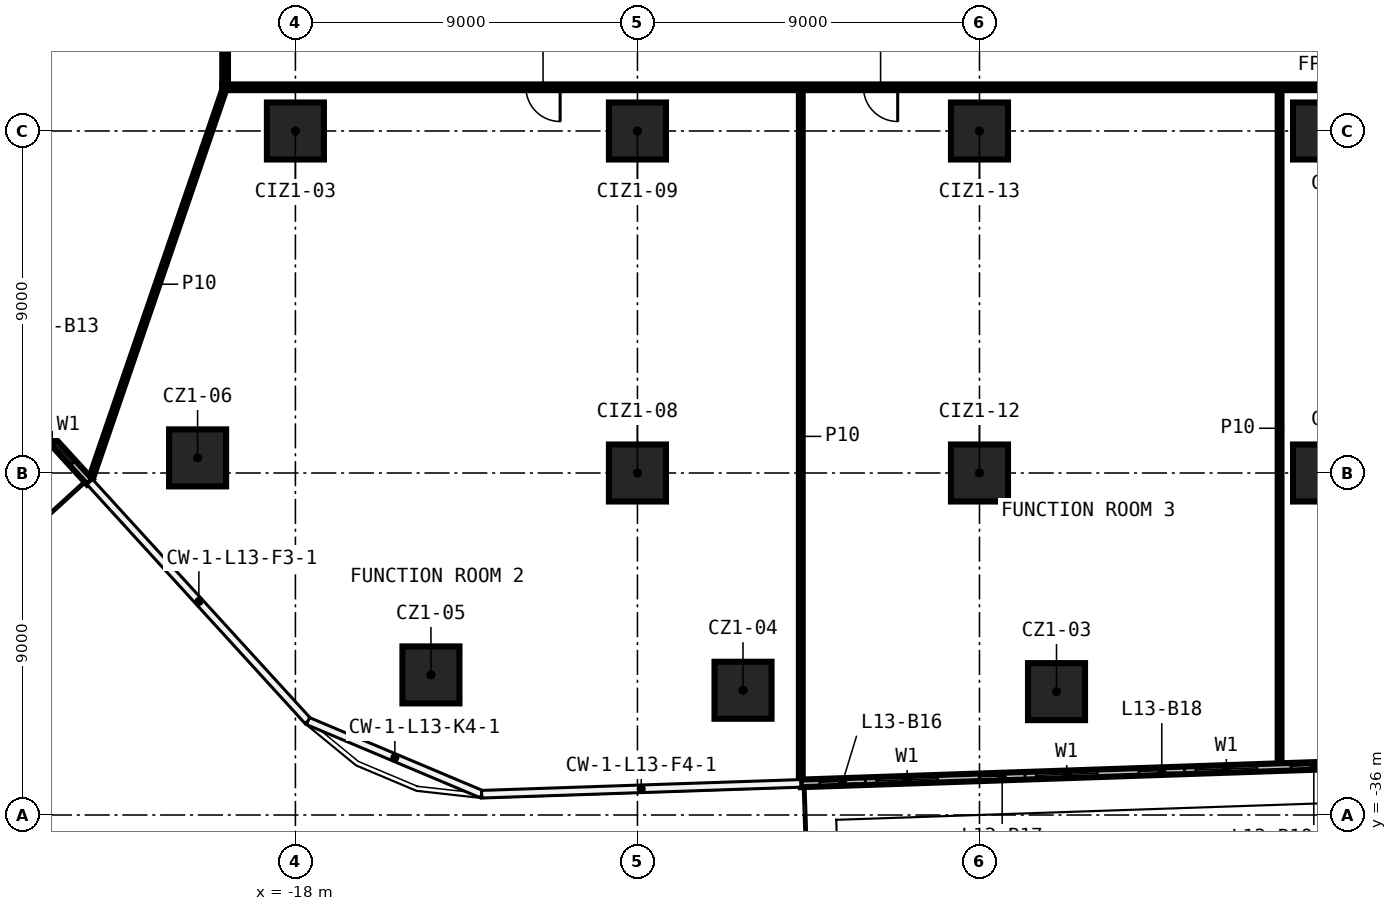
"""IFC4 building model, lengths in metres.
Left out: names, types, materials, properties, quantities, classifications, styles, units other than length and angle.
Written with IfcOpenShell. Run it as: python <this file> out.ifc"""

import sys

from ifc_helpers import new_model, si_unit, direction, frame, frame_2d, origin, origin_2d, place, context, subcontext, project, spatial, rectangle, extrude, element, fill, save


model = new_model("IFC4")
c1 = context("Model", 3, precision=1e-05, world=origin(), true_north=direction((0.0, 1.0)))
c2 = subcontext(c1, "Body", "Model", "MODEL_VIEW")
j1 = project(units=[si_unit("LENGTHUNIT", "METRE"), si_unit("PLANEANGLEUNIT", "RADIAN")], contexts=[c1])
p1 = place(None, origin())
s1 = spatial("IfcSite", under=j1, at=p1, CompositionType="ELEMENT")
p2 = place(p1, origin())
s2 = spatial("IfcBuilding", under=s1, at=p2, CompositionType="ELEMENT")
p3 = place(p2, frame((0.0, 0.0, 69.9)))
s3 = spatial("IfcBuildingStorey", under=s2, at=p3, CompositionType="ELEMENT", Elevation=69.9)
for number, where, z_axis, x_axis in (
    (1, (2.027, -32.753, 0.0), (0.0, 0.0, 1.0), (1.0, 0.0, 0.0)),
    (2, (-6.222, -32.717, 0.0), (0.0, 0.0, 1.0), (1.0, 0.0, 0.0)),
    (3, (-14.434, -32.313, 0.0), (0.0, 0.0, 1.0), (1.0, 0.0, 0.0)),
    (4, (-20.574, -26.602, 0.0), (0.0, 0.0, 1.0), (1.0, 0.0, 0.0)),
    (5, (-18.0, -18.0, 0.0), (0.0, 0.0, 1.0), (1.0, 0.0, 0.0)),
    (6, (-9.0, -27.0, 0.0), (0.0, 0.0, 1.0), (1.0, 0.0, 0.0)),
    (7, (-9.0, -18.0, 0.0), (0.0, 0.0, 1.0), (1.0, 0.0, 0.0)),
    (8, (0.0, -27.0, 0.0), (0.0, 0.0, 1.0), (1.0, 0.0, 0.0)),
    (9, (0.0, -18.0, 0.0), (0.0, 0.0, 1.0), (1.0, 0.0, 0.0)),
    (10, (9.0, -27.0, 0.0), (0.0, 0.0, 1.0), (1.0, 0.0, 0.0)),
    (11, (9.0, -18.0, 0.0), (0.0, 0.0, 1.0), (1.0, 0.0, 0.0)),
):
    element("IfcColumn", number, at=place(p3, frame(where, z_axis=z_axis, x_axis=x_axis)), inside=s3, PredefinedType="COLUMN", context=c2, shape_type="SweptSolid", body=[
        extrude(rectangle(XDim=1.5, YDim=1.5, at=origin_2d()), origin(), (0.0, 0.0, 1.0), 3.3),
    ])
p4 = place(p3, frame((19.925, -16.85, 0.0), z_axis=(0.0, 0.0, 1.0), x_axis=(-1.0, 0.0, 0.0)))
e12 = element("IfcWall", 12, at=p4, inside=s3, PredefinedType="PARTITIONING", context=c2, shape_type="SweptSolid", body=[
    extrude(rectangle(XDim=39.85, YDim=0.15, at=frame_2d((19.925, 0.0))), origin(), (0.0, 0.0, 1.0), 3.3),
])
p5 = place(p4, frame((30.959, 0.0, 0.0)))
e13 = element("IfcOpeningElement", 13, at=p5, cuts=e12, PredefinedType="OPENING", context=c2, shape_type="SweptSolid", body=[
    extrude(rectangle(XDim=0.9, YDim=2.1, at=frame_2d((0.45, 1.05))), frame((0.0, 0.085, 0.0), z_axis=(0.0, -1.0, 0.0), x_axis=(1.0, 0.0, 0.0)), (0.0, 0.0, 1.0), 0.17),
])
p6 = place(p4, frame((22.077, 0.0, 0.0)))
e14 = element("IfcOpeningElement", 14, at=p6, cuts=e12, PredefinedType="OPENING", context=c2, shape_type="SweptSolid", body=[
    extrude(rectangle(XDim=0.9, YDim=2.1, at=frame_2d((0.45, 1.05))), frame((0.0, 0.085, 0.0), z_axis=(0.0, -1.0, 0.0), x_axis=(1.0, 0.0, 0.0)), (0.0, 0.0, 1.0), 0.17),
])
p7 = place(p3, frame((-23.404, -27.213, 0.0), z_axis=(0.0, 0.0, 1.0), x_axis=(0.32441263541, 0.945915663253, 0.0)))
e15 = element("IfcWall", 15, at=p7, inside=s3, PredefinedType="PARTITIONING", context=c2, shape_type="SweptSolid", body=[
    extrude(rectangle(XDim=10.955, YDim=0.1, at=frame_2d((5.478, 0.0))), origin(), (0.0, 0.0, 1.0), 3.3),
])
p8 = place(p3, frame((7.897, -34.72, 0.0), z_axis=(0.0, 0.0, 1.0), x_axis=(0.0, 1.0, 0.0)))
e16 = element("IfcWall", 16, at=p8, inside=s3, PredefinedType="PARTITIONING", context=c2, shape_type="SweptSolid", body=[
    extrude(rectangle(XDim=17.795, YDim=0.1, at=frame_2d((8.897, 0.0))), origin(), (0.0, 0.0, 1.0), 3.3),
])
p9 = place(p3, frame((-4.702, -35.148, 0.0), z_axis=(0.0, 0.0, 1.0), x_axis=(0.0, 1.0, 0.0)))
e17 = element("IfcWall", 17, at=p9, inside=s3, PredefinedType="PARTITIONING", context=c2, shape_type="SweptSolid", body=[
    extrude(rectangle(XDim=18.223, YDim=0.1, at=frame_2d((9.111, 0.0))), origin(), (0.0, 0.0, 1.0), 3.3),
])
p10 = place(p3, frame((-19.85, -16.775, 0.0), z_axis=(0.0, 0.0, 1.0), x_axis=(0.0, 1.0, 0.0)))
e18 = element("IfcWall", 18, at=p10, inside=s3, PredefinedType="PARTITIONING", context=c2, shape_type="SweptSolid", body=[
    extrude(rectangle(XDim=33.55, YDim=0.15, at=frame_2d((16.775, 0.0))), origin(), (0.0, 0.0, 1.0), 3.3),
])
p11 = place(p10, frame((10.123, 0.0, 0.0)))
e19 = element("IfcOpeningElement", 19, at=p11, cuts=e18, PredefinedType="OPENING", context=c2, shape_type="SweptSolid", body=[
    extrude(rectangle(XDim=1.0, YDim=2.1, at=frame_2d((0.5, 1.05))), frame((0.0, 0.085, 0.0), z_axis=(0.0, -1.0, 0.0), x_axis=(1.0, 0.0, 0.0)), (0.0, 0.0, 1.0), 0.17),
])
p12 = place(p10, frame((4.179, 0.0, 0.0)))
e20 = element("IfcOpeningElement", 20, at=p12, cuts=e18, PredefinedType="OPENING", context=c2, shape_type="SweptSolid", body=[
    extrude(rectangle(XDim=0.9, YDim=2.1, at=frame_2d((0.45, 1.05))), frame((0.0, 0.085, 0.0), z_axis=(0.0, -1.0, 0.0), x_axis=(1.0, 0.0, 0.0)), (0.0, 0.0, 1.0), 0.17),
])
p13 = place(p10, frame((27.651, 0.0, 0.0)))
e21 = element("IfcOpeningElement", 21, at=p13, cuts=e18, PredefinedType="OPENING", context=c2, shape_type="SweptSolid", body=[
    extrude(rectangle(XDim=1.0, YDim=2.1, at=frame_2d((0.5, 1.05))), frame((0.0, 0.085, 0.0), z_axis=(0.0, -1.0, 0.0), x_axis=(1.0, 0.0, 0.0)), (0.0, 0.0, 1.0), 0.17),
])
p14 = place(p10, frame((20.601, 0.0, 0.0)))
e22 = element("IfcOpeningElement", 22, at=p14, cuts=e18, PredefinedType="OPENING", context=c2, shape_type="SweptSolid", body=[
    extrude(rectangle(XDim=1.0, YDim=2.1, at=frame_2d((0.5, 1.05))), frame((0.0, 0.085, 0.0), z_axis=(0.0, -1.0, 0.0), x_axis=(1.0, 0.0, 0.0)), (0.0, 0.0, 1.0), 0.17),
])
p15 = place(p3, frame((-34.906, -14.636, 0.0), z_axis=(0.0, 0.0, 1.0), x_axis=(0.674011334321, -0.738721003632, 0.0)))
e23 = element("IfcWall", 23, at=p15, inside=s3, PredefinedType="SOLIDWALL", context=c2, shape_type="SweptSolid", body=[
    extrude(rectangle(XDim=17.053, YDim=0.2, at=frame_2d((8.527, 0.0))), origin(), (0.0, 0.0, 1.0), 3.3),
])
p16 = place(p15, frame((0.5, 0.0, 0.6)))
e24 = element("IfcOpeningElement", 24, at=p16, cuts=e23, PredefinedType="OPENING", context=c2, shape_type="SweptSolid", body=[
    extrude(rectangle(XDim=1.6, YDim=2.4, at=frame_2d((0.8, 1.2))), frame((0.0, 0.11, 0.0), z_axis=(0.0, -1.0, 0.0), x_axis=(1.0, 0.0, 0.0)), (0.0, 0.0, 1.0), 0.22),
])
p17 = place(p15, frame((2.4, 0.0, 0.0)))
e25 = element("IfcOpeningElement", 25, at=p17, cuts=e23, PredefinedType="OPENING", context=c2, shape_type="SweptSolid", body=[
    extrude(rectangle(XDim=1.2, YDim=2.4, at=frame_2d((0.6, 1.2))), frame((0.0, 0.11, 0.0), z_axis=(0.0, -1.0, 0.0), x_axis=(1.0, 0.0, 0.0)), (0.0, 0.0, 1.0), 0.22),
])
p18 = place(p15, frame((6.263, 0.0, 0.6)))
e26 = element("IfcOpeningElement", 26, at=p18, cuts=e23, PredefinedType="OPENING", context=c2, shape_type="SweptSolid", body=[
    extrude(rectangle(XDim=1.6, YDim=2.4, at=frame_2d((0.8, 1.2))), frame((0.0, 0.11, 0.0), z_axis=(0.0, -1.0, 0.0), x_axis=(1.0, 0.0, 0.0)), (0.0, 0.0, 1.0), 0.22),
])
p19 = place(p15, frame((4.763, 0.0, 0.0)))
e27 = element("IfcOpeningElement", 27, at=p19, cuts=e23, PredefinedType="OPENING", context=c2, shape_type="SweptSolid", body=[
    extrude(rectangle(XDim=1.2, YDim=2.4, at=frame_2d((0.6, 1.2))), frame((0.0, 0.11, 0.0), z_axis=(0.0, -1.0, 0.0), x_axis=(1.0, 0.0, 0.0)), (0.0, 0.0, 1.0), 0.22),
])
p20 = place(p15, frame((9.027, 0.0, 0.6)))
e28 = element("IfcOpeningElement", 28, at=p20, cuts=e23, PredefinedType="OPENING", context=c2, shape_type="SweptSolid", body=[
    extrude(rectangle(XDim=1.6, YDim=2.4, at=frame_2d((0.8, 1.2))), frame((0.0, 0.11, 0.0), z_axis=(0.0, -1.0, 0.0), x_axis=(1.0, 0.0, 0.0)), (0.0, 0.0, 1.0), 0.22),
])
p21 = place(p15, frame((10.927, 0.0, 0.0)))
e29 = element("IfcOpeningElement", 29, at=p21, cuts=e23, PredefinedType="OPENING", context=c2, shape_type="SweptSolid", body=[
    extrude(rectangle(XDim=1.2, YDim=2.4, at=frame_2d((0.6, 1.2))), frame((0.0, 0.11, 0.0), z_axis=(0.0, -1.0, 0.0), x_axis=(1.0, 0.0, 0.0)), (0.0, 0.0, 1.0), 0.22),
])
p22 = place(p15, frame((14.79, 0.0, 0.6)))
e30 = element("IfcOpeningElement", 30, at=p22, cuts=e23, PredefinedType="OPENING", context=c2, shape_type="SweptSolid", body=[
    extrude(rectangle(XDim=1.6, YDim=2.4, at=frame_2d((0.8, 1.2))), frame((0.0, 0.11, 0.0), z_axis=(0.0, -1.0, 0.0), x_axis=(1.0, 0.0, 0.0)), (0.0, 0.0, 1.0), 0.22),
])
p23 = place(p15, frame((13.29, 0.0, 0.0)))
e31 = element("IfcOpeningElement", 31, at=p23, cuts=e23, PredefinedType="OPENING", context=c2, shape_type="SweptSolid", body=[
    extrude(rectangle(XDim=1.2, YDim=2.4, at=frame_2d((0.6, 1.2))), frame((0.0, 0.11, 0.0), z_axis=(0.0, -1.0, 0.0), x_axis=(1.0, 0.0, 0.0)), (0.0, 0.0, 1.0), 0.22),
])
p24 = place(p3, frame((-4.702, -35.168, 0.0), z_axis=(0.0, 0.0, 1.0), x_axis=(0.999424265527, 0.033928416948, 0.0)))
e32 = element("IfcWall", 32, at=p24, inside=s3, PredefinedType="SOLIDWALL", context=c2, shape_type="SweptSolid", body=[
    extrude(rectangle(XDim=21.012, YDim=0.2, at=frame_2d((10.506, 0.0))), origin(), (0.0, 0.0, 1.0), 3.3),
])
p25 = place(p24, frame((2.0, 0.0, 0.6)))
e33 = element("IfcOpeningElement", 33, at=p25, cuts=e32, PredefinedType="OPENING", context=c2, shape_type="SweptSolid", body=[
    extrude(rectangle(XDim=1.6, YDim=2.4, at=frame_2d((0.8, 1.2))), frame((0.0, 0.11, 0.0), z_axis=(0.0, -1.0, 0.0), x_axis=(1.0, 0.0, 0.0)), (0.0, 0.0, 1.0), 0.22),
])
p26 = place(p24, frame((0.5, 0.0, 0.0)))
e34 = element("IfcOpeningElement", 34, at=p26, cuts=e32, PredefinedType="OPENING", context=c2, shape_type="SweptSolid", body=[
    extrude(rectangle(XDim=1.2, YDim=2.4, at=frame_2d((0.6, 1.2))), frame((0.0, 0.11, 0.0), z_axis=(0.0, -1.0, 0.0), x_axis=(1.0, 0.0, 0.0)), (0.0, 0.0, 1.0), 0.22),
])
p27 = place(p24, frame((6.202, 0.0, 0.6)))
e35 = element("IfcOpeningElement", 35, at=p27, cuts=e32, PredefinedType="OPENING", context=c2, shape_type="SweptSolid", body=[
    extrude(rectangle(XDim=1.6, YDim=2.4, at=frame_2d((0.8, 1.2))), frame((0.0, 0.11, 0.0), z_axis=(0.0, -1.0, 0.0), x_axis=(1.0, 0.0, 0.0)), (0.0, 0.0, 1.0), 0.22),
])
p28 = place(p24, frame((4.702, 0.0, 0.0)))
e36 = element("IfcOpeningElement", 36, at=p28, cuts=e32, PredefinedType="OPENING", context=c2, shape_type="SweptSolid", body=[
    extrude(rectangle(XDim=1.2, YDim=2.4, at=frame_2d((0.6, 1.2))), frame((0.0, 0.11, 0.0), z_axis=(0.0, -1.0, 0.0), x_axis=(1.0, 0.0, 0.0)), (0.0, 0.0, 1.0), 0.22),
])
p29 = place(p24, frame((10.405, 0.0, 0.6)))
e37 = element("IfcOpeningElement", 37, at=p29, cuts=e32, PredefinedType="OPENING", context=c2, shape_type="SweptSolid", body=[
    extrude(rectangle(XDim=1.6, YDim=2.4, at=frame_2d((0.8, 1.2))), frame((0.0, 0.11, 0.0), z_axis=(0.0, -1.0, 0.0), x_axis=(1.0, 0.0, 0.0)), (0.0, 0.0, 1.0), 0.22),
])
p30 = place(p24, frame((8.905, 0.0, 0.0)))
e38 = element("IfcOpeningElement", 38, at=p30, cuts=e32, PredefinedType="OPENING", context=c2, shape_type="SweptSolid", body=[
    extrude(rectangle(XDim=1.2, YDim=2.4, at=frame_2d((0.6, 1.2))), frame((0.0, 0.11, 0.0), z_axis=(0.0, -1.0, 0.0), x_axis=(1.0, 0.0, 0.0)), (0.0, 0.0, 1.0), 0.22),
])
p31 = place(p24, frame((14.607, 0.0, 0.6)))
e39 = element("IfcOpeningElement", 39, at=p31, cuts=e32, PredefinedType="OPENING", context=c2, shape_type="SweptSolid", body=[
    extrude(rectangle(XDim=1.6, YDim=2.4, at=frame_2d((0.8, 1.2))), frame((0.0, 0.11, 0.0), z_axis=(0.0, -1.0, 0.0), x_axis=(1.0, 0.0, 0.0)), (0.0, 0.0, 1.0), 0.22),
])
p32 = place(p24, frame((12.907, 0.0, 0.0)))
e40 = element("IfcOpeningElement", 40, at=p32, cuts=e32, PredefinedType="OPENING", context=c2, shape_type="SweptSolid", body=[
    extrude(rectangle(XDim=1.2, YDim=2.4, at=frame_2d((0.6, 1.2))), frame((0.0, 0.11, 0.0), z_axis=(0.0, -1.0, 0.0), x_axis=(1.0, 0.0, 0.0)), (0.0, 0.0, 1.0), 0.22),
])
p33 = place(p24, frame((18.809, 0.0, 0.6)))
e41 = element("IfcOpeningElement", 41, at=p33, cuts=e32, PredefinedType="OPENING", context=c2, shape_type="SweptSolid", body=[
    extrude(rectangle(XDim=1.6, YDim=2.4, at=frame_2d((0.8, 1.2))), frame((0.0, 0.11, 0.0), z_axis=(0.0, -1.0, 0.0), x_axis=(1.0, 0.0, 0.0)), (0.0, 0.0, 1.0), 0.22),
])
p34 = place(p24, frame((17.309, 0.0, 0.0)))
e42 = element("IfcOpeningElement", 42, at=p34, cuts=e32, PredefinedType="OPENING", context=c2, shape_type="SweptSolid", body=[
    extrude(rectangle(XDim=1.2, YDim=2.4, at=frame_2d((0.6, 1.2))), frame((0.0, 0.11, 0.0), z_axis=(0.0, -1.0, 0.0), x_axis=(1.0, 0.0, 0.0)), (0.0, 0.0, 1.0), 0.22),
])
p35 = place(p5, origin())
e43 = element("IfcDoor", 43, at=p35, inside=s3, OperationType="SINGLE_SWING_RIGHT", PredefinedType="DOOR", context=c2, shape_type="SweptSolid", body=[
    extrude(rectangle(XDim=0.9, YDim=2.1, at=frame_2d((0.45, 1.05))), frame((0.0, 0.025, 0.0), z_axis=(0.0, -1.0, 0.0), x_axis=(1.0, 0.0, 0.0)), (0.0, 0.0, 1.0), 0.05),
])
fill(e13, e43)
p36 = place(p6, origin())
e44 = element("IfcDoor", 44, at=p36, inside=s3, OperationType="SINGLE_SWING_LEFT", PredefinedType="DOOR", context=c2, shape_type="SweptSolid", body=[
    extrude(rectangle(XDim=0.9, YDim=2.1, at=frame_2d((0.45, 1.05))), frame((0.0, 0.025, 0.0), z_axis=(0.0, -1.0, 0.0), x_axis=(1.0, 0.0, 0.0)), (0.0, 0.0, 1.0), 0.05),
])
fill(e14, e44)
p37 = place(p22, origin())
e45 = element("IfcWindow", 45, at=p37, inside=s3, PartitioningType="SINGLE_PANEL", PredefinedType="WINDOW", context=c2, shape_type="SweptSolid", body=[
    extrude(rectangle(XDim=1.6, YDim=2.4, at=frame_2d((0.8, 1.2))), frame((0.0, 0.03, 0.0), z_axis=(0.0, -1.0, 0.0), x_axis=(1.0, 0.0, 0.0)), (0.0, 0.0, 1.0), 0.06),
])
fill(e30, e45)
p38 = place(p25, origin())
e46 = element("IfcWindow", 46, at=p38, inside=s3, PartitioningType="SINGLE_PANEL", PredefinedType="WINDOW", context=c2, shape_type="SweptSolid", body=[
    extrude(rectangle(XDim=1.6, YDim=2.4, at=frame_2d((0.8, 1.2))), frame((0.0, 0.03, 0.0), z_axis=(0.0, -1.0, 0.0), x_axis=(1.0, 0.0, 0.0)), (0.0, 0.0, 1.0), 0.06),
])
fill(e33, e46)
p39 = place(p26, origin())
e47 = element("IfcDoor", 47, at=p39, inside=s3, OperationType="SLIDING_TO_LEFT", PredefinedType="DOOR", context=c2, shape_type="SweptSolid", body=[
    extrude(rectangle(XDim=1.2, YDim=2.4, at=frame_2d((0.6, 1.2))), frame((0.0, 0.025, 0.0), z_axis=(0.0, -1.0, 0.0), x_axis=(1.0, 0.0, 0.0)), (0.0, 0.0, 1.0), 0.05),
])
fill(e34, e47)
p40 = place(p27, origin())
e48 = element("IfcWindow", 48, at=p40, inside=s3, PartitioningType="SINGLE_PANEL", PredefinedType="WINDOW", context=c2, shape_type="SweptSolid", body=[
    extrude(rectangle(XDim=1.6, YDim=2.4, at=frame_2d((0.8, 1.2))), frame((0.0, 0.03, 0.0), z_axis=(0.0, -1.0, 0.0), x_axis=(1.0, 0.0, 0.0)), (0.0, 0.0, 1.0), 0.06),
])
fill(e35, e48)
p41 = place(p28, origin())
e49 = element("IfcDoor", 49, at=p41, inside=s3, OperationType="SLIDING_TO_LEFT", PredefinedType="DOOR", context=c2, shape_type="SweptSolid", body=[
    extrude(rectangle(XDim=1.2, YDim=2.4, at=frame_2d((0.6, 1.2))), frame((0.0, 0.025, 0.0), z_axis=(0.0, -1.0, 0.0), x_axis=(1.0, 0.0, 0.0)), (0.0, 0.0, 1.0), 0.05),
])
fill(e36, e49)
p42 = place(p29, origin())
e50 = element("IfcWindow", 50, at=p42, inside=s3, PartitioningType="SINGLE_PANEL", PredefinedType="WINDOW", context=c2, shape_type="SweptSolid", body=[
    extrude(rectangle(XDim=1.6, YDim=2.4, at=frame_2d((0.8, 1.2))), frame((0.0, 0.03, 0.0), z_axis=(0.0, -1.0, 0.0), x_axis=(1.0, 0.0, 0.0)), (0.0, 0.0, 1.0), 0.06),
])
fill(e37, e50)
p43 = place(p30, origin())
e51 = element("IfcDoor", 51, at=p43, inside=s3, OperationType="SLIDING_TO_LEFT", PredefinedType="DOOR", context=c2, shape_type="SweptSolid", body=[
    extrude(rectangle(XDim=1.2, YDim=2.4, at=frame_2d((0.6, 1.2))), frame((0.0, 0.025, 0.0), z_axis=(0.0, -1.0, 0.0), x_axis=(1.0, 0.0, 0.0)), (0.0, 0.0, 1.0), 0.05),
])
fill(e38, e51)
p44 = place(p32, origin())
e52 = element("IfcDoor", 52, at=p44, inside=s3, OperationType="SLIDING_TO_LEFT", PredefinedType="DOOR", context=c2, shape_type="SweptSolid", body=[
    extrude(rectangle(XDim=1.2, YDim=2.4, at=frame_2d((0.6, 1.2))), frame((0.0, 0.025, 0.0), z_axis=(0.0, -1.0, 0.0), x_axis=(1.0, 0.0, 0.0)), (0.0, 0.0, 1.0), 0.05),
])
fill(e40, e52)
save(model, sys.argv[1])
